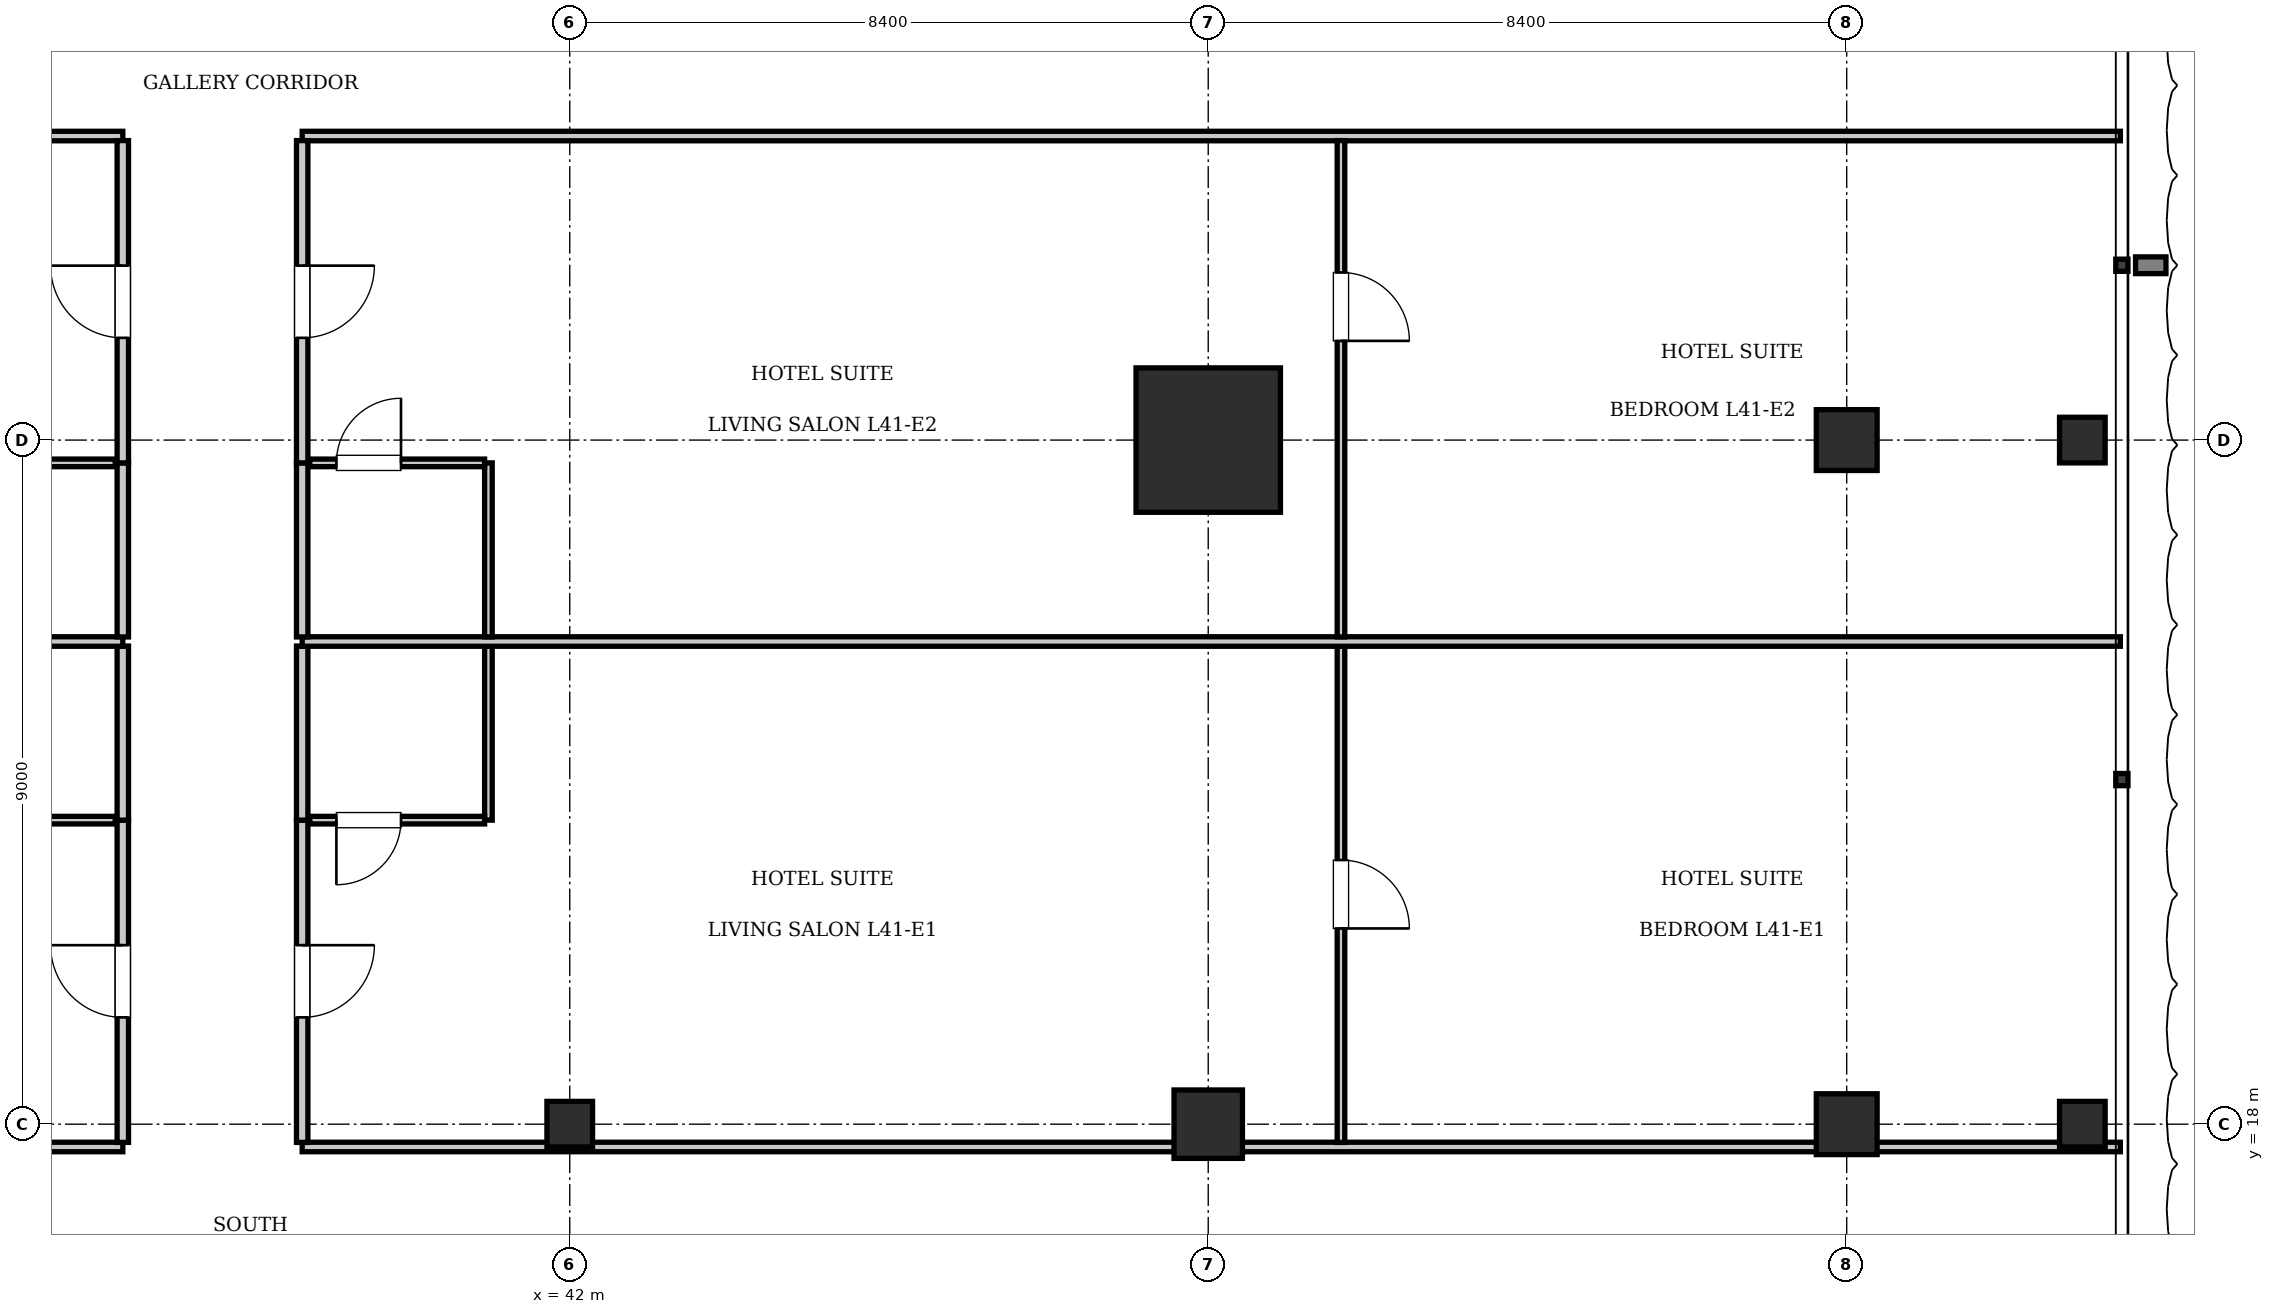
"""IFC4 building model, lengths in metres.
Left out: names, types, materials, properties, quantities, classifications, styles, units other than length and angle.
Written with IfcOpenShell. Run it as: python <this file> out.ifc"""

import sys

from ifc_helpers import new_model, si_unit, direction, frame, frame_2d, origin, origin_2d, place, context, subcontext, project, spatial, rectangle, i_section, extrude, element, fill, save


model = new_model("IFC4")
c1 = context("Model", 3, precision=1e-05, world=origin(), true_north=direction((0.0, 1.0)))
c2 = subcontext(c1, "Body", "Model", "MODEL_VIEW")
j1 = project(units=[si_unit("LENGTHUNIT", "METRE"), si_unit("PLANEANGLEUNIT", "RADIAN")], contexts=[c1])
p1 = place(None, origin())
s1 = spatial("IfcSite", under=j1, at=p1, CompositionType="ELEMENT")
p2 = place(p1, origin())
s2 = spatial("IfcBuilding", under=s1, at=p2, CompositionType="ELEMENT")
p3 = place(p2, frame((0.0, 0.0, 169.75)))
s3 = spatial("IfcBuildingStorey", under=s2, at=p3, CompositionType="ELEMENT", Elevation=169.75)
p4 = place(p3, frame((50.4, 27.0, 0.0), z_axis=(0.0, 0.0, 1.0), x_axis=(1.0, 0.0, 0.0)))
e1 = element("IfcColumn", 1, at=p4, inside=s3, PredefinedType="COLUMN", context=c2, shape_type="SweptSolid", body=[
    extrude(rectangle(XDim=1.9, YDim=1.9, at=origin_2d()), origin(), (0.0, 0.0, 1.0), 3.85),
])
p5 = place(p3, frame((50.4, 18.0, 0.0), z_axis=(0.0, 0.0, 1.0), x_axis=(1.0, 0.0, 0.0)))
e2 = element("IfcColumn", 2, at=p5, inside=s3, PredefinedType="COLUMN", context=c2, shape_type="SweptSolid", body=[
    extrude(rectangle(XDim=0.9, YDim=0.9, at=origin_2d()), origin(), (0.0, 0.0, 1.0), 3.85),
])
p6 = place(p3, frame((42.0, 18.0, 0.0), z_axis=(0.0, 0.0, 1.0), x_axis=(1.0, 0.0, 0.0)))
e3 = element("IfcColumn", 3, at=p6, inside=s3, PredefinedType="COLUMN", context=c2, shape_type="SweptSolid", body=[
    extrude(i_section(OverallWidth=0.6, OverallDepth=0.6, WebThickness=0.025, FlangeThickness=0.038, at=origin_2d()), origin(), (0.0, 0.0, 1.0), 3.85),
])
for number, where, z_axis, x_axis in (
    (4, (58.8, 18.0, 0.0), (0.0, 0.0, 1.0), (1.0, 0.0, 0.0)),
    (5, (58.8, 27.0, 0.0), (0.0, 0.0, 1.0), (1.0, 0.0, 0.0)),
):
    element("IfcColumn", number, at=place(p3, frame(where, z_axis=z_axis, x_axis=x_axis)), inside=s3, PredefinedType="COLUMN", context=c2, shape_type="SweptSolid", body=[
        extrude(rectangle(XDim=0.8, YDim=0.8, at=origin_2d()), origin(), (0.0, 0.0, 1.0), 3.85),
    ])
for number, where, z_axis, x_axis in (
    (6, (61.9, 18.0, 0.0), (0.0, 0.0, 1.0), (1.0, 0.0, 0.0)),
    (7, (61.9, 27.0, 0.0), (0.0, 0.0, 1.0), (1.0, 0.0, 0.0)),
):
    element("IfcColumn", number, at=place(p3, frame(where, z_axis=z_axis, x_axis=x_axis)), inside=s3, PredefinedType="COLUMN", context=c2, shape_type="SweptSolid", body=[
        extrude(i_section(OverallWidth=0.6, OverallDepth=0.6, WebThickness=0.025, FlangeThickness=0.038, at=origin_2d()), origin(), (0.0, 0.0, 1.0), 3.85),
    ])
p7 = place(p3, frame((13.2, 17.7, 0.0), z_axis=(0.0, 0.0, 1.0), x_axis=(1.0, 0.0, 0.0)))
e8 = element("IfcWall", 8, at=p7, inside=s3, PredefinedType="PARTITIONING", context=c2, shape_type="SweptSolid", body=[
    extrude(rectangle(XDim=22.92, YDim=0.125, at=frame_2d((11.46, 0.0))), origin(), (0.0, 0.0, 1.0), 3.61),
])
p8 = place(p3, frame((38.48, 17.7, 0.0), z_axis=(0.0, 0.0, 1.0), x_axis=(1.0, 0.0, 0.0)))
e9 = element("IfcWall", 9, at=p8, inside=s3, PredefinedType="PARTITIONING", context=c2, shape_type="SweptSolid", body=[
    extrude(rectangle(XDim=23.92, YDim=0.125, at=frame_2d((11.96, 0.0))), origin(), (0.0, 0.0, 1.0), 3.61),
])
p9 = place(p3, frame((13.2, 31.0, 0.0), z_axis=(0.0, 0.0, 1.0), x_axis=(1.0, 0.0, 0.0)))
e10 = element("IfcWall", 10, at=p9, inside=s3, PredefinedType="PARTITIONING", context=c2, shape_type="SweptSolid", body=[
    extrude(rectangle(XDim=22.92, YDim=0.125, at=frame_2d((11.46, 0.0))), origin(), (0.0, 0.0, 1.0), 3.61),
])
p10 = place(p3, frame((38.48, 31.0, 0.0), z_axis=(0.0, 0.0, 1.0), x_axis=(1.0, 0.0, 0.0)))
e11 = element("IfcWall", 11, at=p10, inside=s3, PredefinedType="PARTITIONING", context=c2, shape_type="SweptSolid", body=[
    extrude(rectangle(XDim=23.92, YDim=0.125, at=frame_2d((11.96, 0.0))), origin(), (0.0, 0.0, 1.0), 3.61),
])
p11 = place(p3, frame((36.12, 17.76, 0.0), z_axis=(0.0, 0.0, 1.0), x_axis=(0.0, 1.0, 0.0)))
e12 = element("IfcWall", 12, at=p11, inside=s3, PredefinedType="PARTITIONING", context=c2, shape_type="SweptSolid", body=[
    extrude(rectangle(XDim=4.24, YDim=0.15, at=frame_2d((2.12, 0.0))), origin(), (0.0, 0.0, 1.0), 3.61),
])
p12 = place(p11, frame((1.645, 0.0, 0.0)))
e13 = element("IfcOpeningElement", 13, at=p12, cuts=e12, PredefinedType="OPENING", context=c2, shape_type="SweptSolid", body=[
    extrude(rectangle(XDim=0.95, YDim=2.15, at=frame_2d((0.475, 1.075))), frame((0.0, 0.085, 0.0), z_axis=(0.0, -1.0, 0.0), x_axis=(1.0, 0.0, 0.0)), (0.0, 0.0, 1.0), 0.17),
])
p13 = place(p3, frame((36.12, 22.0, 0.0), z_axis=(0.0, 0.0, 1.0), x_axis=(0.0, 1.0, 0.0)))
e14 = element("IfcWall", 14, at=p13, inside=s3, PredefinedType="PARTITIONING", context=c2, shape_type="SweptSolid", body=[
    extrude(rectangle(XDim=2.29, YDim=0.15, at=frame_2d((1.145, 0.0))), origin(), (0.0, 0.0, 1.0), 3.61),
])
p14 = place(p3, frame((33.72, 22.0, 0.0), z_axis=(0.0, 0.0, 1.0), x_axis=(1.0, 0.0, 0.0)))
e15 = element("IfcWall", 15, at=p14, inside=s3, PredefinedType="PARTITIONING", context=c2, shape_type="SweptSolid", body=[
    extrude(rectangle(XDim=2.3, YDim=0.1, at=frame_2d((1.15, 0.0))), origin(), (0.0, 0.0, 1.0), 3.61),
])
p15 = place(p14, frame((0.35, 0.0, 0.0)))
e16 = element("IfcOpeningElement", 16, at=p15, cuts=e15, PredefinedType="OPENING", context=c2, shape_type="SweptSolid", body=[
    extrude(rectangle(XDim=0.85, YDim=2.1, at=frame_2d((0.425, 1.05))), frame((0.0, 0.06, 0.0), z_axis=(0.0, -1.0, 0.0), x_axis=(1.0, 0.0, 0.0)), (0.0, 0.0, 1.0), 0.12),
])
p16 = place(p3, frame((38.48, 17.76, 0.0), z_axis=(0.0, 0.0, 1.0), x_axis=(0.0, 1.0, 0.0)))
e17 = element("IfcWall", 17, at=p16, inside=s3, PredefinedType="PARTITIONING", context=c2, shape_type="SweptSolid", body=[
    extrude(rectangle(XDim=4.24, YDim=0.15, at=frame_2d((2.12, 0.0))), origin(), (0.0, 0.0, 1.0), 3.61),
])
p17 = place(p16, frame((1.645, 0.0, 0.0)))
e18 = element("IfcOpeningElement", 18, at=p17, cuts=e17, PredefinedType="OPENING", context=c2, shape_type="SweptSolid", body=[
    extrude(rectangle(XDim=0.95, YDim=2.15, at=frame_2d((0.475, 1.075))), frame((0.0, 0.085, 0.0), z_axis=(0.0, -1.0, 0.0), x_axis=(1.0, 0.0, 0.0)), (0.0, 0.0, 1.0), 0.17),
])
p18 = place(p3, frame((38.48, 22.0, 0.0), z_axis=(0.0, 0.0, 1.0), x_axis=(0.0, 1.0, 0.0)))
e19 = element("IfcWall", 19, at=p18, inside=s3, PredefinedType="PARTITIONING", context=c2, shape_type="SweptSolid", body=[
    extrude(rectangle(XDim=2.29, YDim=0.15, at=frame_2d((1.145, 0.0))), origin(), (0.0, 0.0, 1.0), 3.61),
])
p19 = place(p3, frame((40.93, 22.0, 0.0), z_axis=(0.0, 0.0, 1.0), x_axis=(0.0, 1.0, 0.0)))
e20 = element("IfcWall", 20, at=p19, inside=s3, PredefinedType="PARTITIONING", context=c2, shape_type="SweptSolid", body=[
    extrude(rectangle(XDim=2.29, YDim=0.1, at=frame_2d((1.145, 0.0))), origin(), (0.0, 0.0, 1.0), 3.61),
])
p20 = place(p3, frame((38.58, 22.0, 0.0), z_axis=(0.0, 0.0, 1.0), x_axis=(1.0, 0.0, 0.0)))
e21 = element("IfcWall", 21, at=p20, inside=s3, PredefinedType="PARTITIONING", context=c2, shape_type="SweptSolid", body=[
    extrude(rectangle(XDim=2.3, YDim=0.1, at=frame_2d((1.15, 0.0))), origin(), (0.0, 0.0, 1.0), 3.61),
])
p21 = place(p20, frame((0.35, 0.0, 0.0)))
e22 = element("IfcOpeningElement", 22, at=p21, cuts=e21, PredefinedType="OPENING", context=c2, shape_type="SweptSolid", body=[
    extrude(rectangle(XDim=0.85, YDim=2.1, at=frame_2d((0.425, 1.05))), frame((0.0, 0.06, 0.0), z_axis=(0.0, -1.0, 0.0), x_axis=(1.0, 0.0, 0.0)), (0.0, 0.0, 1.0), 0.12),
])
p22 = place(p3, frame((52.146, 17.76, 0.0), z_axis=(0.0, 0.0, 1.0), x_axis=(0.0, 1.0, 0.0)))
e23 = element("IfcWall", 23, at=p22, inside=s3, PredefinedType="PARTITIONING", context=c2, shape_type="SweptSolid", body=[
    extrude(rectangle(XDim=6.53, YDim=0.1, at=frame_2d((3.265, 0.0))), origin(), (0.0, 0.0, 1.0), 3.61),
])
p23 = place(p22, frame((2.815, 0.0, 0.0)))
e24 = element("IfcOpeningElement", 24, at=p23, cuts=e23, PredefinedType="OPENING", context=c2, shape_type="SweptSolid", body=[
    extrude(rectangle(XDim=0.9, YDim=2.1, at=frame_2d((0.45, 1.05))), frame((0.0, 0.06, 0.0), z_axis=(0.0, -1.0, 0.0), x_axis=(1.0, 0.0, 0.0)), (0.0, 0.0, 1.0), 0.12),
])
p24 = place(p3, frame((13.2, 24.35, 0.0), z_axis=(0.0, 0.0, 1.0), x_axis=(1.0, 0.0, 0.0)))
e25 = element("IfcWall", 25, at=p24, inside=s3, PredefinedType="PARTITIONING", context=c2, shape_type="SweptSolid", body=[
    extrude(rectangle(XDim=22.92, YDim=0.125, at=frame_2d((11.46, 0.0))), origin(), (0.0, 0.0, 1.0), 3.61),
])
p25 = place(p3, frame((38.48, 24.35, 0.0), z_axis=(0.0, 0.0, 1.0), x_axis=(1.0, 0.0, 0.0)))
e26 = element("IfcWall", 26, at=p25, inside=s3, PredefinedType="PARTITIONING", context=c2, shape_type="SweptSolid", body=[
    extrude(rectangle(XDim=23.92, YDim=0.125, at=frame_2d((11.96, 0.0))), origin(), (0.0, 0.0, 1.0), 3.61),
])
p26 = place(p3, frame((36.12, 24.41, 0.0), z_axis=(0.0, 0.0, 1.0), x_axis=(0.0, 1.0, 0.0)))
e27 = element("IfcWall", 27, at=p26, inside=s3, PredefinedType="PARTITIONING", context=c2, shape_type="SweptSolid", body=[
    extrude(rectangle(XDim=2.29, YDim=0.15, at=frame_2d((1.145, 0.0))), origin(), (0.0, 0.0, 1.0), 3.61),
])
p27 = place(p3, frame((36.12, 26.7, 0.0), z_axis=(0.0, 0.0, 1.0), x_axis=(0.0, 1.0, 0.0)))
e28 = element("IfcWall", 28, at=p27, inside=s3, PredefinedType="PARTITIONING", context=c2, shape_type="SweptSolid", body=[
    extrude(rectangle(XDim=4.24, YDim=0.15, at=frame_2d((2.12, 0.0))), origin(), (0.0, 0.0, 1.0), 3.61),
])
p28 = place(p27, frame((1.645, 0.0, 0.0)))
e29 = element("IfcOpeningElement", 29, at=p28, cuts=e28, PredefinedType="OPENING", context=c2, shape_type="SweptSolid", body=[
    extrude(rectangle(XDim=0.95, YDim=2.15, at=frame_2d((0.475, 1.075))), frame((0.0, 0.085, 0.0), z_axis=(0.0, -1.0, 0.0), x_axis=(1.0, 0.0, 0.0)), (0.0, 0.0, 1.0), 0.17),
])
p29 = place(p3, frame((33.72, 26.7, 0.0), z_axis=(0.0, 0.0, 1.0), x_axis=(1.0, 0.0, 0.0)))
e30 = element("IfcWall", 30, at=p29, inside=s3, PredefinedType="PARTITIONING", context=c2, shape_type="SweptSolid", body=[
    extrude(rectangle(XDim=2.3, YDim=0.1, at=frame_2d((1.15, 0.0))), origin(), (0.0, 0.0, 1.0), 3.61),
])
p30 = place(p29, frame((0.35, 0.0, 0.0)))
e31 = element("IfcOpeningElement", 31, at=p30, cuts=e30, PredefinedType="OPENING", context=c2, shape_type="SweptSolid", body=[
    extrude(rectangle(XDim=0.85, YDim=2.1, at=frame_2d((0.425, 1.05))), frame((0.0, 0.06, 0.0), z_axis=(0.0, -1.0, 0.0), x_axis=(1.0, 0.0, 0.0)), (0.0, 0.0, 1.0), 0.12),
])
p31 = place(p3, frame((38.48, 24.41, 0.0), z_axis=(0.0, 0.0, 1.0), x_axis=(0.0, 1.0, 0.0)))
e32 = element("IfcWall", 32, at=p31, inside=s3, PredefinedType="PARTITIONING", context=c2, shape_type="SweptSolid", body=[
    extrude(rectangle(XDim=2.29, YDim=0.15, at=frame_2d((1.145, 0.0))), origin(), (0.0, 0.0, 1.0), 3.61),
])
p32 = place(p3, frame((38.48, 26.7, 0.0), z_axis=(0.0, 0.0, 1.0), x_axis=(0.0, 1.0, 0.0)))
e33 = element("IfcWall", 33, at=p32, inside=s3, PredefinedType="PARTITIONING", context=c2, shape_type="SweptSolid", body=[
    extrude(rectangle(XDim=4.24, YDim=0.15, at=frame_2d((2.12, 0.0))), origin(), (0.0, 0.0, 1.0), 3.61),
])
p33 = place(p32, frame((1.645, 0.0, 0.0)))
e34 = element("IfcOpeningElement", 34, at=p33, cuts=e33, PredefinedType="OPENING", context=c2, shape_type="SweptSolid", body=[
    extrude(rectangle(XDim=0.95, YDim=2.15, at=frame_2d((0.475, 1.075))), frame((0.0, 0.085, 0.0), z_axis=(0.0, -1.0, 0.0), x_axis=(1.0, 0.0, 0.0)), (0.0, 0.0, 1.0), 0.17),
])
p34 = place(p3, frame((40.93, 24.41, 0.0), z_axis=(0.0, 0.0, 1.0), x_axis=(0.0, 1.0, 0.0)))
e35 = element("IfcWall", 35, at=p34, inside=s3, PredefinedType="PARTITIONING", context=c2, shape_type="SweptSolid", body=[
    extrude(rectangle(XDim=2.29, YDim=0.1, at=frame_2d((1.145, 0.0))), origin(), (0.0, 0.0, 1.0), 3.61),
])
p35 = place(p3, frame((38.58, 26.7, 0.0), z_axis=(0.0, 0.0, 1.0), x_axis=(1.0, 0.0, 0.0)))
e36 = element("IfcWall", 36, at=p35, inside=s3, PredefinedType="PARTITIONING", context=c2, shape_type="SweptSolid", body=[
    extrude(rectangle(XDim=2.3, YDim=0.1, at=frame_2d((1.15, 0.0))), origin(), (0.0, 0.0, 1.0), 3.61),
])
p36 = place(p35, frame((0.35, 0.0, 0.0)))
e37 = element("IfcOpeningElement", 37, at=p36, cuts=e36, PredefinedType="OPENING", context=c2, shape_type="SweptSolid", body=[
    extrude(rectangle(XDim=0.85, YDim=2.1, at=frame_2d((0.425, 1.05))), frame((0.0, 0.06, 0.0), z_axis=(0.0, -1.0, 0.0), x_axis=(1.0, 0.0, 0.0)), (0.0, 0.0, 1.0), 0.12),
])
p37 = place(p3, frame((52.146, 24.41, 0.0), z_axis=(0.0, 0.0, 1.0), x_axis=(0.0, 1.0, 0.0)))
e38 = element("IfcWall", 38, at=p37, inside=s3, PredefinedType="PARTITIONING", context=c2, shape_type="SweptSolid", body=[
    extrude(rectangle(XDim=6.53, YDim=0.1, at=frame_2d((3.265, 0.0))), origin(), (0.0, 0.0, 1.0), 3.61),
])
p38 = place(p37, frame((3.895, 0.0, 0.0)))
e39 = element("IfcOpeningElement", 39, at=p38, cuts=e38, PredefinedType="OPENING", context=c2, shape_type="SweptSolid", body=[
    extrude(rectangle(XDim=0.9, YDim=2.1, at=frame_2d((0.45, 1.05))), frame((0.0, 0.06, 0.0), z_axis=(0.0, -1.0, 0.0), x_axis=(1.0, 0.0, 0.0)), (0.0, 0.0, 1.0), 0.12),
])
p39 = place(p12, origin())
e40 = element("IfcDoor", 40, at=p39, inside=s3, OperationType="SINGLE_SWING_RIGHT", PredefinedType="DOOR", context=c2, shape_type="SweptSolid", body=[
    extrude(rectangle(XDim=0.95, YDim=2.15, at=frame_2d((0.475, 1.075))), frame((0.0, 0.025, 0.0), z_axis=(0.0, -1.0, 0.0), x_axis=(1.0, 0.0, 0.0)), (0.0, 0.0, 1.0), 0.05),
])
fill(e13, e40)
p40 = place(p21, frame((0.85, 0.0, 0.0), z_axis=(0.0, 0.0, 1.0), x_axis=(-1.0, 0.0, 0.0)))
e41 = element("IfcDoor", 41, at=p40, inside=s3, OperationType="SINGLE_SWING_RIGHT", PredefinedType="DOOR", context=c2, shape_type="SweptSolid", body=[
    extrude(rectangle(XDim=0.85, YDim=2.1, at=frame_2d((0.425, 1.05))), frame((0.0, 0.025, 0.0), z_axis=(0.0, -1.0, 0.0), x_axis=(1.0, 0.0, 0.0)), (0.0, 0.0, 1.0), 0.05),
])
fill(e22, e41)
p41 = place(p17, frame((0.95, 0.0, 0.0), z_axis=(0.0, 0.0, 1.0), x_axis=(-1.0, 0.0, 0.0)))
e42 = element("IfcDoor", 42, at=p41, inside=s3, OperationType="SINGLE_SWING_LEFT", PredefinedType="DOOR", context=c2, shape_type="SweptSolid", body=[
    extrude(rectangle(XDim=0.95, YDim=2.15, at=frame_2d((0.475, 1.075))), frame((0.0, 0.025, 0.0), z_axis=(0.0, -1.0, 0.0), x_axis=(1.0, 0.0, 0.0)), (0.0, 0.0, 1.0), 0.05),
])
fill(e18, e42)
p42 = place(p23, frame((0.9, 0.0, 0.0), z_axis=(0.0, 0.0, 1.0), x_axis=(-1.0, 0.0, 0.0)))
e43 = element("IfcDoor", 43, at=p42, inside=s3, OperationType="SINGLE_SWING_RIGHT", PredefinedType="DOOR", context=c2, shape_type="SweptSolid", body=[
    extrude(rectangle(XDim=0.9, YDim=2.1, at=frame_2d((0.45, 1.05))), frame((0.0, 0.025, 0.0), z_axis=(0.0, -1.0, 0.0), x_axis=(1.0, 0.0, 0.0)), (0.0, 0.0, 1.0), 0.05),
])
fill(e24, e43)
p43 = place(p28, origin())
e44 = element("IfcDoor", 44, at=p43, inside=s3, OperationType="SINGLE_SWING_RIGHT", PredefinedType="DOOR", context=c2, shape_type="SweptSolid", body=[
    extrude(rectangle(XDim=0.95, YDim=2.15, at=frame_2d((0.475, 1.075))), frame((0.0, 0.025, 0.0), z_axis=(0.0, -1.0, 0.0), x_axis=(1.0, 0.0, 0.0)), (0.0, 0.0, 1.0), 0.05),
])
fill(e29, e44)
p44 = place(p36, origin())
e45 = element("IfcDoor", 45, at=p44, inside=s3, OperationType="SINGLE_SWING_RIGHT", PredefinedType="DOOR", context=c2, shape_type="SweptSolid", body=[
    extrude(rectangle(XDim=0.85, YDim=2.1, at=frame_2d((0.425, 1.05))), frame((0.0, 0.025, 0.0), z_axis=(0.0, -1.0, 0.0), x_axis=(1.0, 0.0, 0.0)), (0.0, 0.0, 1.0), 0.05),
])
fill(e37, e45)
p45 = place(p33, frame((0.95, 0.0, 0.0), z_axis=(0.0, 0.0, 1.0), x_axis=(-1.0, 0.0, 0.0)))
e46 = element("IfcDoor", 46, at=p45, inside=s3, OperationType="SINGLE_SWING_LEFT", PredefinedType="DOOR", context=c2, shape_type="SweptSolid", body=[
    extrude(rectangle(XDim=0.95, YDim=2.15, at=frame_2d((0.475, 1.075))), frame((0.0, 0.025, 0.0), z_axis=(0.0, -1.0, 0.0), x_axis=(1.0, 0.0, 0.0)), (0.0, 0.0, 1.0), 0.05),
])
fill(e34, e46)
p46 = place(p38, frame((0.9, 0.0, 0.0), z_axis=(0.0, 0.0, 1.0), x_axis=(-1.0, 0.0, 0.0)))
e47 = element("IfcDoor", 47, at=p46, inside=s3, OperationType="SINGLE_SWING_RIGHT", PredefinedType="DOOR", context=c2, shape_type="SweptSolid", body=[
    extrude(rectangle(XDim=0.9, YDim=2.1, at=frame_2d((0.45, 1.05))), frame((0.0, 0.025, 0.0), z_axis=(0.0, -1.0, 0.0), x_axis=(1.0, 0.0, 0.0)), (0.0, 0.0, 1.0), 0.05),
])
fill(e39, e47)
save(model, sys.argv[1])
